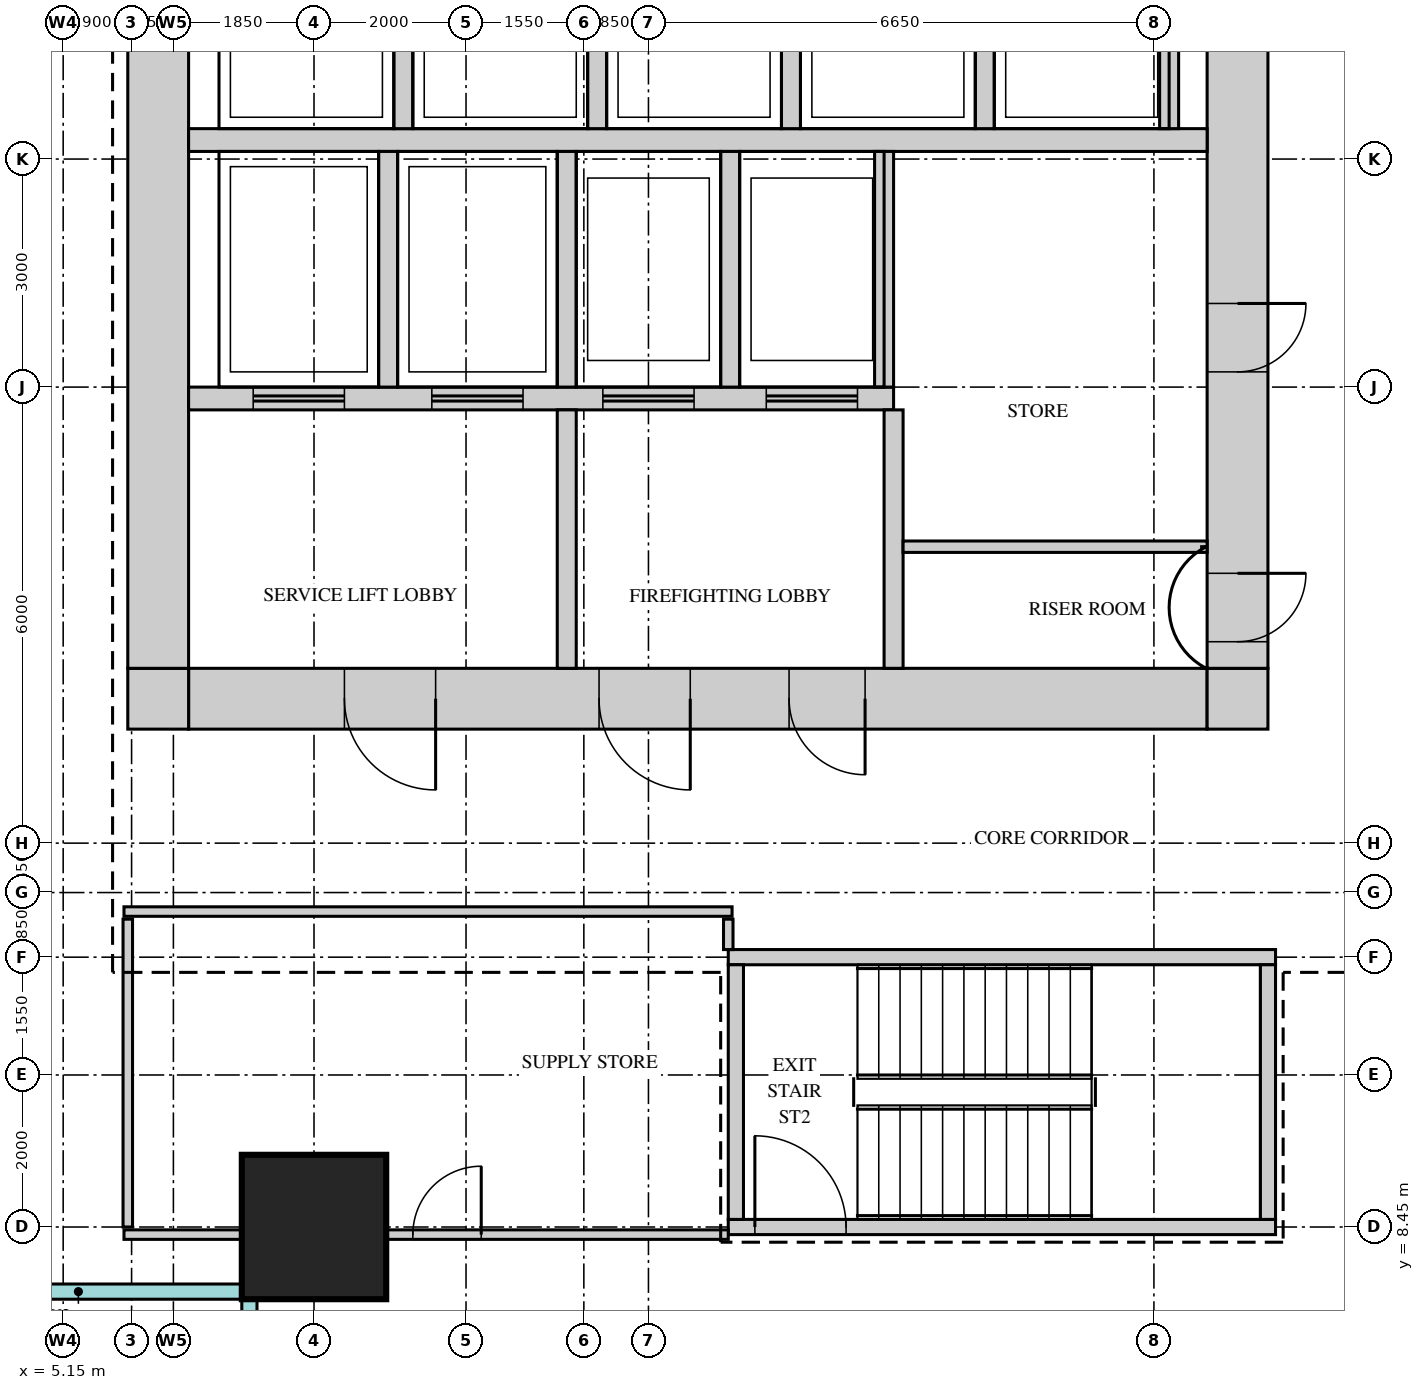
"""IFC4 building model, lengths in metres.
Left out: names, types, materials, properties, quantities, classifications, styles, units other than length and angle.
Written with IfcOpenShell. Run it as: python <this file> out.ifc"""

import sys

from ifc_helpers import new_model, si_unit, direction, frame, frame_2d, origin, origin_2d, place, context, subcontext, project, spatial, rectangle, extrude, source, transform, mapped, element, fill, save


model = new_model("IFC4")
c1 = context("Model", 3, precision=1e-05, world=origin(), true_north=direction((0.0, 1.0)))
c2 = subcontext(c1, "Body", "Model", "MODEL_VIEW")
j1 = project(units=[si_unit("LENGTHUNIT", "METRE"), si_unit("PLANEANGLEUNIT", "RADIAN")], contexts=[c1])
p1 = place(None, origin())
s1 = spatial("IfcSite", under=j1, at=p1, CompositionType="ELEMENT")
p2 = place(p1, origin())
s2 = spatial("IfcBuilding", under=s1, at=p2, CompositionType="ELEMENT")
p3 = place(p2, frame((0.0, 0.0, 212.7)))
s3 = spatial("IfcBuildingStorey", under=s2, at=p3, CompositionType="ELEMENT", Elevation=212.7)
m1 = source(origin(), c2, "Body", "SweptSolid", [
    extrude(rectangle(XDim=13.4, YDim=0.8, at=frame_2d((6.7, 0.0))), origin(), (0.0, 0.0, 1.0), 3.75),
])
p4 = place(p3, frame((6.8, 15.4, 0.0), z_axis=(0.0, 0.0, 1.0), x_axis=(1.0, 0.0, 0.0)))
e1 = element("IfcWall", 1, at=p4, inside=s3, PredefinedType="SHEAR", context=c2, shape_type="MappedRepresentation", body=[
    mapped(m1, transform((0.0, 0.0, 0.0))),
])
m2 = source(origin(), c2, "Body", "SweptSolid", [
    extrude(rectangle(XDim=1.2, YDim=2.1, at=frame_2d((0.6, 1.05))), frame((0.0, 0.41, 0.0), z_axis=(0.0, -1.0, 0.0), x_axis=(1.0, 0.0, 0.0)), (0.0, 0.0, 1.0), 0.82),
])
p5 = place(p4, frame((5.4, 0.0, 0.0)))
e2 = element("IfcOpeningElement", 2, at=p5, cuts=e1, PredefinedType="OPENING", context=c2, shape_type="MappedRepresentation", body=[
    mapped(m2, transform((0.0, 0.0, 0.0))),
])
p6 = place(p4, frame((2.05, 0.0, 0.0)))
e3 = element("IfcOpeningElement", 3, at=p6, cuts=e1, PredefinedType="OPENING", context=c2, shape_type="MappedRepresentation", body=[
    mapped(m2, transform((0.0, 0.0, 0.0))),
])
m3 = source(origin(), c2, "Body", "SweptSolid", [
    extrude(rectangle(XDim=1.0, YDim=2.1, at=frame_2d((0.5, 1.05))), frame((0.0, 0.41, 0.0), z_axis=(0.0, -1.0, 0.0), x_axis=(1.0, 0.0, 0.0)), (0.0, 0.0, 1.0), 0.82),
])
p7 = place(p4, frame((7.9, 0.0, 0.0)))
e4 = element("IfcOpeningElement", 4, at=p7, cuts=e1, PredefinedType="OPENING", context=c2, shape_type="MappedRepresentation", body=[
    mapped(m3, transform((0.0, 0.0, 0.0))),
])
m4 = source(origin(), c2, "Body", "SweptSolid", [
    extrude(rectangle(XDim=0.8, YDim=0.8, at=frame_2d((0.4, 0.0))), origin(), (0.0, 0.0, 1.0), 3.75),
])
for number, where, z_axis, x_axis in (
    (5, (20.2, 15.4, 0.0), (0.0, 0.0, 1.0), (1.0, 0.0, 0.0)),
    (6, (6.0, 15.4, 0.0), (0.0, 0.0, 1.0), (1.0, 0.0, 0.0)),
):
    element("IfcWall", number, at=place(p3, frame(where, z_axis=z_axis, x_axis=x_axis)), inside=s3, PredefinedType="SHEAR", context=c2, shape_type="MappedRepresentation", body=[
        mapped(m4, transform((0.0, 0.0, 0.0))),
    ])
m5 = source(origin(), c2, "Body", "SweptSolid", [
    extrude(rectangle(XDim=22.4, YDim=0.8, at=frame_2d((11.2, 0.0))), origin(), (0.0, 0.0, 1.0), 3.75),
])
p8 = place(p3, frame((20.6, 15.8, 0.0), z_axis=(0.0, 0.0, 1.0), x_axis=(0.0, 1.0, 0.0)))
e7 = element("IfcWall", 7, at=p8, inside=s3, PredefinedType="SHEAR", context=c2, shape_type="MappedRepresentation", body=[
    mapped(m5, transform((0.0, 0.0, 0.0))),
])
m6 = source(origin(), c2, "Body", "SweptSolid", [
    extrude(rectangle(XDim=1.8, YDim=2.1, at=frame_2d((0.9, 1.05))), frame((0.0, 0.41, 0.0), z_axis=(0.0, -1.0, 0.0), x_axis=(1.0, 0.0, 0.0)), (0.0, 0.0, 1.0), 0.82),
])
p9 = place(p8, frame((10.7, 0.0, 0.0)))
e8 = element("IfcOpeningElement", 8, at=p9, cuts=e7, PredefinedType="OPENING", context=c2, shape_type="MappedRepresentation", body=[
    mapped(m6, transform((0.0, 0.0, 0.0))),
])
m7 = source(origin(), c2, "Body", "SweptSolid", [
    extrude(rectangle(XDim=0.9, YDim=2.1, at=frame_2d((0.45, 1.05))), frame((0.0, 0.41, 0.0), z_axis=(0.0, -1.0, 0.0), x_axis=(1.0, 0.0, 0.0)), (0.0, 0.0, 1.0), 0.82),
])
p10 = place(p8, frame((0.35, 0.0, 0.0)))
e9 = element("IfcOpeningElement", 9, at=p10, cuts=e7, PredefinedType="OPENING", context=c2, shape_type="MappedRepresentation", body=[
    mapped(m7, transform((0.0, 0.0, 0.0))),
])
p11 = place(p8, frame((3.9, 0.0, 0.0)))
e10 = element("IfcOpeningElement", 10, at=p11, cuts=e7, PredefinedType="OPENING", context=c2, shape_type="MappedRepresentation", body=[
    mapped(m7, transform((0.0, 0.0, 0.0))),
])
p12 = place(p3, frame((6.4, 15.8, 0.0), z_axis=(0.0, 0.0, 1.0), x_axis=(0.0, 1.0, 0.0)))
e11 = element("IfcWall", 11, at=p12, inside=s3, PredefinedType="SHEAR", context=c2, shape_type="MappedRepresentation", body=[
    mapped(m5, transform((0.0, 0.0, 0.0))),
])
m8 = source(origin(), c2, "Body", "SweptSolid", [
    extrude(rectangle(XDim=7.2, YDim=0.2, at=frame_2d((3.6, 0.0))), origin(), (0.0, 0.0, 1.0), 3.75),
])
p13 = place(p3, frame((13.9, 12.0, 0.0), z_axis=(0.0, 0.0, 1.0), x_axis=(1.0, 0.0, 0.0)))
e12 = element("IfcWall", 12, at=p13, inside=s3, PredefinedType="SHEAR", context=c2, shape_type="MappedRepresentation", body=[
    mapped(m8, transform((0.0, 0.0, 0.0))),
])
p14 = place(p3, frame((13.9, 8.45, 0.0), z_axis=(0.0, 0.0, 1.0), x_axis=(1.0, 0.0, 0.0)))
e13 = element("IfcWall", 13, at=p14, inside=s3, PredefinedType="SHEAR", context=c2, shape_type="MappedRepresentation", body=[
    mapped(m8, transform((0.0, 0.0, 0.0))),
])
m9 = source(origin(), c2, "Body", "SweptSolid", [
    extrude(rectangle(XDim=1.2, YDim=2.1, at=frame_2d((0.6, 1.05))), frame((0.0, 0.11, 0.0), z_axis=(0.0, -1.0, 0.0), x_axis=(1.0, 0.0, 0.0)), (0.0, 0.0, 1.0), 0.22),
])
p15 = place(p14, frame((0.35, 0.0, 0.0)))
e14 = element("IfcOpeningElement", 14, at=p15, cuts=e13, PredefinedType="OPENING", context=c2, shape_type="MappedRepresentation", body=[
    mapped(m9, transform((0.0, 0.0, 0.0))),
])
m10 = source(origin(), c2, "Body", "SweptSolid", [
    extrude(rectangle(XDim=3.35, YDim=0.2, at=frame_2d((1.675, 0.0))), origin(), (0.0, 0.0, 1.0), 3.75),
])
for number, where, z_axis, x_axis in (
    (15, (21.0, 8.55, 0.0), (0.0, 0.0, 1.0), (0.0, 1.0, 0.0)),
    (16, (14.0, 8.55, 0.0), (0.0, 0.0, 1.0), (0.0, 1.0, 0.0)),
):
    element("IfcWall", number, at=place(p3, frame(where, z_axis=z_axis, x_axis=x_axis)), inside=s3, PredefinedType="SHEAR", context=c2, shape_type="MappedRepresentation", body=[
        mapped(m10, transform((0.0, 0.0, 0.0))),
    ])
m11 = source(origin(), c2, "Body", "SweptSolid", [
    extrude(rectangle(XDim=13.4, YDim=0.3, at=frame_2d((6.7, 0.0))), origin(), (0.0, 0.0, 1.0), 3.75),
])
p16 = place(p3, frame((6.8, 22.75, 0.0), z_axis=(0.0, 0.0, 1.0), x_axis=(1.0, 0.0, 0.0)))
e17 = element("IfcWall", 17, at=p16, inside=s3, PredefinedType="STANDARD", context=c2, shape_type="MappedRepresentation", body=[
    mapped(m11, transform((0.0, 0.0, 0.0))),
])
m12 = source(origin(), c2, "Body", "SweptSolid", [
    extrude(rectangle(XDim=9.275, YDim=0.3, at=frame_2d((4.637, 0.0))), origin(), (0.0, 0.0, 1.0), 3.75),
])
p17 = place(p3, frame((6.8, 19.35, 0.0), z_axis=(0.0, 0.0, 1.0), x_axis=(1.0, 0.0, 0.0)))
e18 = element("IfcWall", 18, at=p17, inside=s3, PredefinedType="STANDARD", context=c2, shape_type="MappedRepresentation", body=[
    mapped(m12, transform((0.0, 0.0, 0.0))),
])
m13 = source(origin(), c2, "Body", "SweptSolid", [
    extrude(rectangle(XDim=1.2, YDim=2.1, at=frame_2d((0.6, 1.05))), frame((0.0, 0.16, 0.0), z_axis=(0.0, -1.0, 0.0), x_axis=(1.0, 0.0, 0.0)), (0.0, 0.0, 1.0), 0.32),
])
p18 = place(p17, frame((0.85, 0.0, 0.0)))
e19 = element("IfcOpeningElement", 19, at=p18, cuts=e18, PredefinedType="OPENING", context=c2, shape_type="MappedRepresentation", body=[
    mapped(m13, transform((0.0, 0.0, 0.0))),
])
p19 = place(p17, frame((3.2, 0.0, 0.0)))
e20 = element("IfcOpeningElement", 20, at=p19, cuts=e18, PredefinedType="OPENING", context=c2, shape_type="MappedRepresentation", body=[
    mapped(m13, transform((0.0, 0.0, 0.0))),
])
p20 = place(p17, frame((5.45, 0.0, 0.0)))
e21 = element("IfcOpeningElement", 21, at=p20, cuts=e18, PredefinedType="OPENING", context=c2, shape_type="MappedRepresentation", body=[
    mapped(m13, transform((0.0, 0.0, 0.0))),
])
p21 = place(p17, frame((7.6, 0.0, 0.0)))
e22 = element("IfcOpeningElement", 22, at=p21, cuts=e18, PredefinedType="OPENING", context=c2, shape_type="MappedRepresentation", body=[
    mapped(m13, transform((0.0, 0.0, 0.0))),
])
m14 = source(origin(), c2, "Body", "SweptSolid", [
    extrude(rectangle(XDim=3.1, YDim=0.25, at=frame_2d((1.55, 0.0))), origin(), (0.0, 0.0, 1.0), 3.75),
])
for number, where, z_axis, x_axis in (
    (23, (9.425, 19.5, 0.0), (0.0, 0.0, 1.0), (0.0, 1.0, 0.0)),
    (24, (11.775, 19.5, 0.0), (0.0, 0.0, 1.0), (0.0, 1.0, 0.0)),
    (25, (13.925, 19.5, 0.0), (0.0, 0.0, 1.0), (0.0, 1.0, 0.0)),
    (26, (15.95, 19.5, 0.0), (0.0, 0.0, 1.0), (0.0, 1.0, 0.0)),
):
    element("IfcWall", number, at=place(p3, frame(where, z_axis=z_axis, x_axis=x_axis)), inside=s3, PredefinedType="STANDARD", context=c2, shape_type="MappedRepresentation", body=[
        mapped(m14, transform((0.0, 0.0, 0.0))),
    ])
m15 = source(origin(), c2, "Body", "SweptSolid", [
    extrude(rectangle(XDim=2.4, YDim=0.25, at=frame_2d((1.2, 0.0))), origin(), (0.0, 0.0, 1.0), 3.75),
])
for number, where, z_axis, x_axis in (
    (27, (17.275, 22.9, 0.0), (0.0, 0.0, 1.0), (0.0, 1.0, 0.0)),
    (28, (19.7, 22.9, 0.0), (0.0, 0.0, 1.0), (0.0, 1.0, 0.0)),
    (29, (9.625, 22.9, 0.0), (0.0, 0.0, 1.0), (0.0, 1.0, 0.0)),
    (30, (12.175, 22.9, 0.0), (0.0, 0.0, 1.0), (0.0, 1.0, 0.0)),
    (31, (14.725, 22.9, 0.0), (0.0, 0.0, 1.0), (0.0, 1.0, 0.0)),
):
    element("IfcWall", number, at=place(p3, frame(where, z_axis=z_axis, x_axis=x_axis)), inside=s3, PredefinedType="STANDARD", context=c2, shape_type="MappedRepresentation", body=[
        mapped(m15, transform((0.0, 0.0, 0.0))),
    ])
m16 = source(origin(), c2, "Body", "SweptSolid", [
    extrude(rectangle(XDim=3.4, YDim=0.25, at=frame_2d((1.7, 0.0))), origin(), (0.0, 0.0, 1.0), 3.75),
])
for number, where, z_axis, x_axis in (
    (32, (16.075, 15.8, 0.0), (0.0, 0.0, 1.0), (0.0, 1.0, 0.0)),
    (33, (11.775, 15.8, 0.0), (0.0, 0.0, 1.0), (0.0, 1.0, 0.0)),
):
    element("IfcWall", number, at=place(p3, frame(where, z_axis=z_axis, x_axis=x_axis)), inside=s3, PredefinedType="STANDARD", context=c2, shape_type="MappedRepresentation", body=[
        mapped(m16, transform((0.0, 0.0, 0.0))),
    ])
m17 = source(origin(), c2, "Body", "SweptSolid", [
    extrude(rectangle(XDim=1.9, YDim=1.9, at=origin_2d()), origin(), (0.0, 0.0, 1.0), 4.0),
])
p22 = place(p3, frame((8.45, 8.45, 0.0), z_axis=(0.0, 0.0, 1.0), x_axis=(1.0, 0.0, 0.0)))
e34 = element("IfcColumn", 34, at=p22, inside=s3, PredefinedType="COLUMN", context=c2, shape_type="MappedRepresentation", body=[
    mapped(m17, transform((0.0, 0.0, 0.0))),
])
m18 = source(origin(), c2, "Body", "SweptSolid", [
    extrude(rectangle(XDim=7.95, YDim=0.125, at=frame_2d((3.975, 0.0))), origin(), (0.0, 0.0, 1.0), 3.1),
])
p23 = place(p3, frame((5.95, 8.35, 0.0), z_axis=(0.0, 0.0, 1.0), x_axis=(1.0, 0.0, 0.0)))
e35 = element("IfcWall", 35, at=p23, inside=s3, PredefinedType="PARTITIONING", context=c2, shape_type="MappedRepresentation", body=[
    mapped(m18, transform((0.0, 0.0, 0.0))),
])
m19 = source(origin(), c2, "Body", "SweptSolid", [
    extrude(rectangle(XDim=0.9, YDim=2.1, at=frame_2d((0.45, 1.05))), frame((0.0, 0.073, 0.0), z_axis=(0.0, -1.0, 0.0), x_axis=(1.0, 0.0, 0.0)), (0.0, 0.0, 1.0), 0.145),
])
p24 = place(p23, frame((3.8, 0.0, 0.0)))
e36 = element("IfcOpeningElement", 36, at=p24, cuts=e35, PredefinedType="OPENING", context=c2, shape_type="MappedRepresentation", body=[
    mapped(m19, transform((0.0, 0.0, 0.0))),
])
m20 = source(origin(), c2, "Body", "SweptSolid", [
    extrude(rectangle(XDim=4.05, YDim=0.125, at=frame_2d((2.025, 0.0))), origin(), (0.0, 0.0, 1.0), 3.8),
])
p25 = place(p3, frame((6.0, 8.45, 0.0), z_axis=(0.0, 0.0, 1.0), x_axis=(0.0, 1.0, 0.0)))
e37 = element("IfcWall", 37, at=p25, inside=s3, PredefinedType="PARTITIONING", context=c2, shape_type="MappedRepresentation", body=[
    mapped(m20, transform((0.0, 0.0, 0.0))),
])
m21 = source(origin(), c2, "Body", "SweptSolid", [
    extrude(rectangle(XDim=0.4, YDim=0.125, at=frame_2d((0.2, 0.0))), origin(), (0.0, 0.0, 1.0), 3.8),
])
p26 = place(p3, frame((13.9, 12.1, 0.0), z_axis=(0.0, 0.0, 1.0), x_axis=(0.0, 1.0, 0.0)))
e38 = element("IfcWall", 38, at=p26, inside=s3, PredefinedType="PARTITIONING", context=c2, shape_type="MappedRepresentation", body=[
    mapped(m21, transform((0.0, 0.0, 0.0))),
])
m22 = source(origin(), c2, "Body", "SweptSolid", [
    extrude(rectangle(XDim=8.0, YDim=0.125, at=frame_2d((4.0, 0.0))), origin(), (0.0, 0.0, 1.0), 3.8),
])
p27 = place(p3, frame((5.95, 12.6, 0.0), z_axis=(0.0, 0.0, 1.0), x_axis=(1.0, 0.0, 0.0)))
e39 = element("IfcWall", 39, at=p27, inside=s3, PredefinedType="PARTITIONING", context=c2, shape_type="MappedRepresentation", body=[
    mapped(m22, transform((0.0, 0.0, 0.0))),
])
m23 = source(origin(), c2, "Body", "SweptSolid", [
    extrude(rectangle(XDim=4.0, YDim=0.15, at=frame_2d((2.0, 0.0))), origin(), (0.0, 0.0, 1.0), 3.8),
])
p28 = place(p3, frame((16.2, 17.4, 0.0), z_axis=(0.0, 0.0, 1.0), x_axis=(1.0, 0.0, 0.0)))
e40 = element("IfcWall", 40, at=p28, inside=s3, PredefinedType="PARTITIONING", context=c2, shape_type="MappedRepresentation", body=[
    mapped(m23, transform((0.0, 0.0, 0.0))),
])
m24 = source(origin(), c2, "Body", "SweptSolid", [
    extrude(rectangle(XDim=0.9, YDim=2.1, at=frame_2d((0.45, 1.05))), frame((0.0, 0.35, 0.0), z_axis=(0.0, -1.0, 0.0), x_axis=(1.0, 0.0, 0.0)), (0.0, 0.0, 1.0), 0.7),
])
p29 = place(p10, origin())
e41 = element("IfcDoor", 41, at=p29, inside=s3, OperationType="SINGLE_SWING_RIGHT", PredefinedType="DOOR", context=c2, shape_type="MappedRepresentation", body=[
    mapped(m24, transform((0.0, 0.0, 0.0))),
])
fill(e9, e41)
p30 = place(p11, origin())
e42 = element("IfcDoor", 42, at=p30, inside=s3, OperationType="SINGLE_SWING_RIGHT", PredefinedType="DOOR", context=c2, shape_type="MappedRepresentation", body=[
    mapped(m24, transform((0.0, 0.0, 0.0))),
])
fill(e10, e42)
m25 = source(origin(), c2, "Body", "SweptSolid", [
    extrude(rectangle(XDim=1.2, YDim=2.1, at=frame_2d((0.6, 1.05))), frame((0.0, 0.35, 0.0), z_axis=(0.0, -1.0, 0.0), x_axis=(1.0, 0.0, 0.0)), (0.0, 0.0, 1.0), 0.7),
])
p31 = place(p5, origin())
e43 = element("IfcDoor", 43, at=p31, inside=s3, OperationType="SINGLE_SWING_RIGHT", PredefinedType="DOOR", context=c2, shape_type="MappedRepresentation", body=[
    mapped(m25, transform((0.0, 0.0, 0.0))),
])
fill(e2, e43)
p32 = place(p6, origin())
e44 = element("IfcDoor", 44, at=p32, inside=s3, OperationType="SINGLE_SWING_RIGHT", PredefinedType="DOOR", context=c2, shape_type="MappedRepresentation", body=[
    mapped(m25, transform((0.0, 0.0, 0.0))),
])
fill(e3, e44)
m26 = source(origin(), c2, "Body", "SweptSolid", [
    extrude(rectangle(XDim=1.0, YDim=2.1, at=frame_2d((0.5, 1.05))), frame((0.0, 0.35, 0.0), z_axis=(0.0, -1.0, 0.0), x_axis=(1.0, 0.0, 0.0)), (0.0, 0.0, 1.0), 0.7),
])
p33 = place(p7, origin())
e45 = element("IfcDoor", 45, at=p33, inside=s3, OperationType="SINGLE_SWING_RIGHT", PredefinedType="DOOR", context=c2, shape_type="MappedRepresentation", body=[
    mapped(m26, transform((0.0, 0.0, 0.0))),
])
fill(e4, e45)
m27 = source(origin(), c2, "Body", "SweptSolid", [
    extrude(rectangle(XDim=0.9, YDim=2.1, at=frame_2d((0.45, 1.05))), frame((0.0, 0.025, 0.0), z_axis=(0.0, -1.0, 0.0), x_axis=(1.0, 0.0, 0.0)), (0.0, 0.0, 1.0), 0.05),
])
p34 = place(p24, origin())
e46 = element("IfcDoor", 46, at=p34, inside=s3, OperationType="SINGLE_SWING_LEFT", PredefinedType="DOOR", context=c2, shape_type="MappedRepresentation", body=[
    mapped(m27, transform((0.0, 0.0, 0.0))),
])
fill(e36, e46)
m28 = source(origin(), c2, "Body", "SweptSolid", [
    extrude(rectangle(XDim=1.2, YDim=2.1, at=frame_2d((0.6, 1.05))), frame((0.0, 0.025, 0.0), z_axis=(0.0, -1.0, 0.0), x_axis=(1.0, 0.0, 0.0)), (0.0, 0.0, 1.0), 0.05),
])
p35 = place(p15, origin())
e47 = element("IfcDoor", 47, at=p35, inside=s3, OperationType="SINGLE_SWING_RIGHT", PredefinedType="DOOR", context=c2, shape_type="MappedRepresentation", body=[
    mapped(m28, transform((0.0, 0.0, 0.0))),
])
fill(e14, e47)
p36 = place(p18, origin())
e48 = element("IfcDoor", 48, at=p36, inside=s3, OperationType="DOUBLE_DOOR_SLIDING", PredefinedType="DOOR", context=c2, shape_type="MappedRepresentation", body=[
    mapped(m28, transform((0.0, 0.0, 0.0))),
])
fill(e19, e48)
p37 = place(p19, origin())
e49 = element("IfcDoor", 49, at=p37, inside=s3, OperationType="DOUBLE_DOOR_SLIDING", PredefinedType="DOOR", context=c2, shape_type="MappedRepresentation", body=[
    mapped(m28, transform((0.0, 0.0, 0.0))),
])
fill(e20, e49)
p38 = place(p20, origin())
e50 = element("IfcDoor", 50, at=p38, inside=s3, OperationType="DOUBLE_DOOR_SLIDING", PredefinedType="DOOR", context=c2, shape_type="MappedRepresentation", body=[
    mapped(m28, transform((0.0, 0.0, 0.0))),
])
fill(e21, e50)
p39 = place(p21, origin())
e51 = element("IfcDoor", 51, at=p39, inside=s3, OperationType="DOUBLE_DOOR_SLIDING", PredefinedType="DOOR", context=c2, shape_type="MappedRepresentation", body=[
    mapped(m28, transform((0.0, 0.0, 0.0))),
])
fill(e22, e51)
save(model, sys.argv[1])
